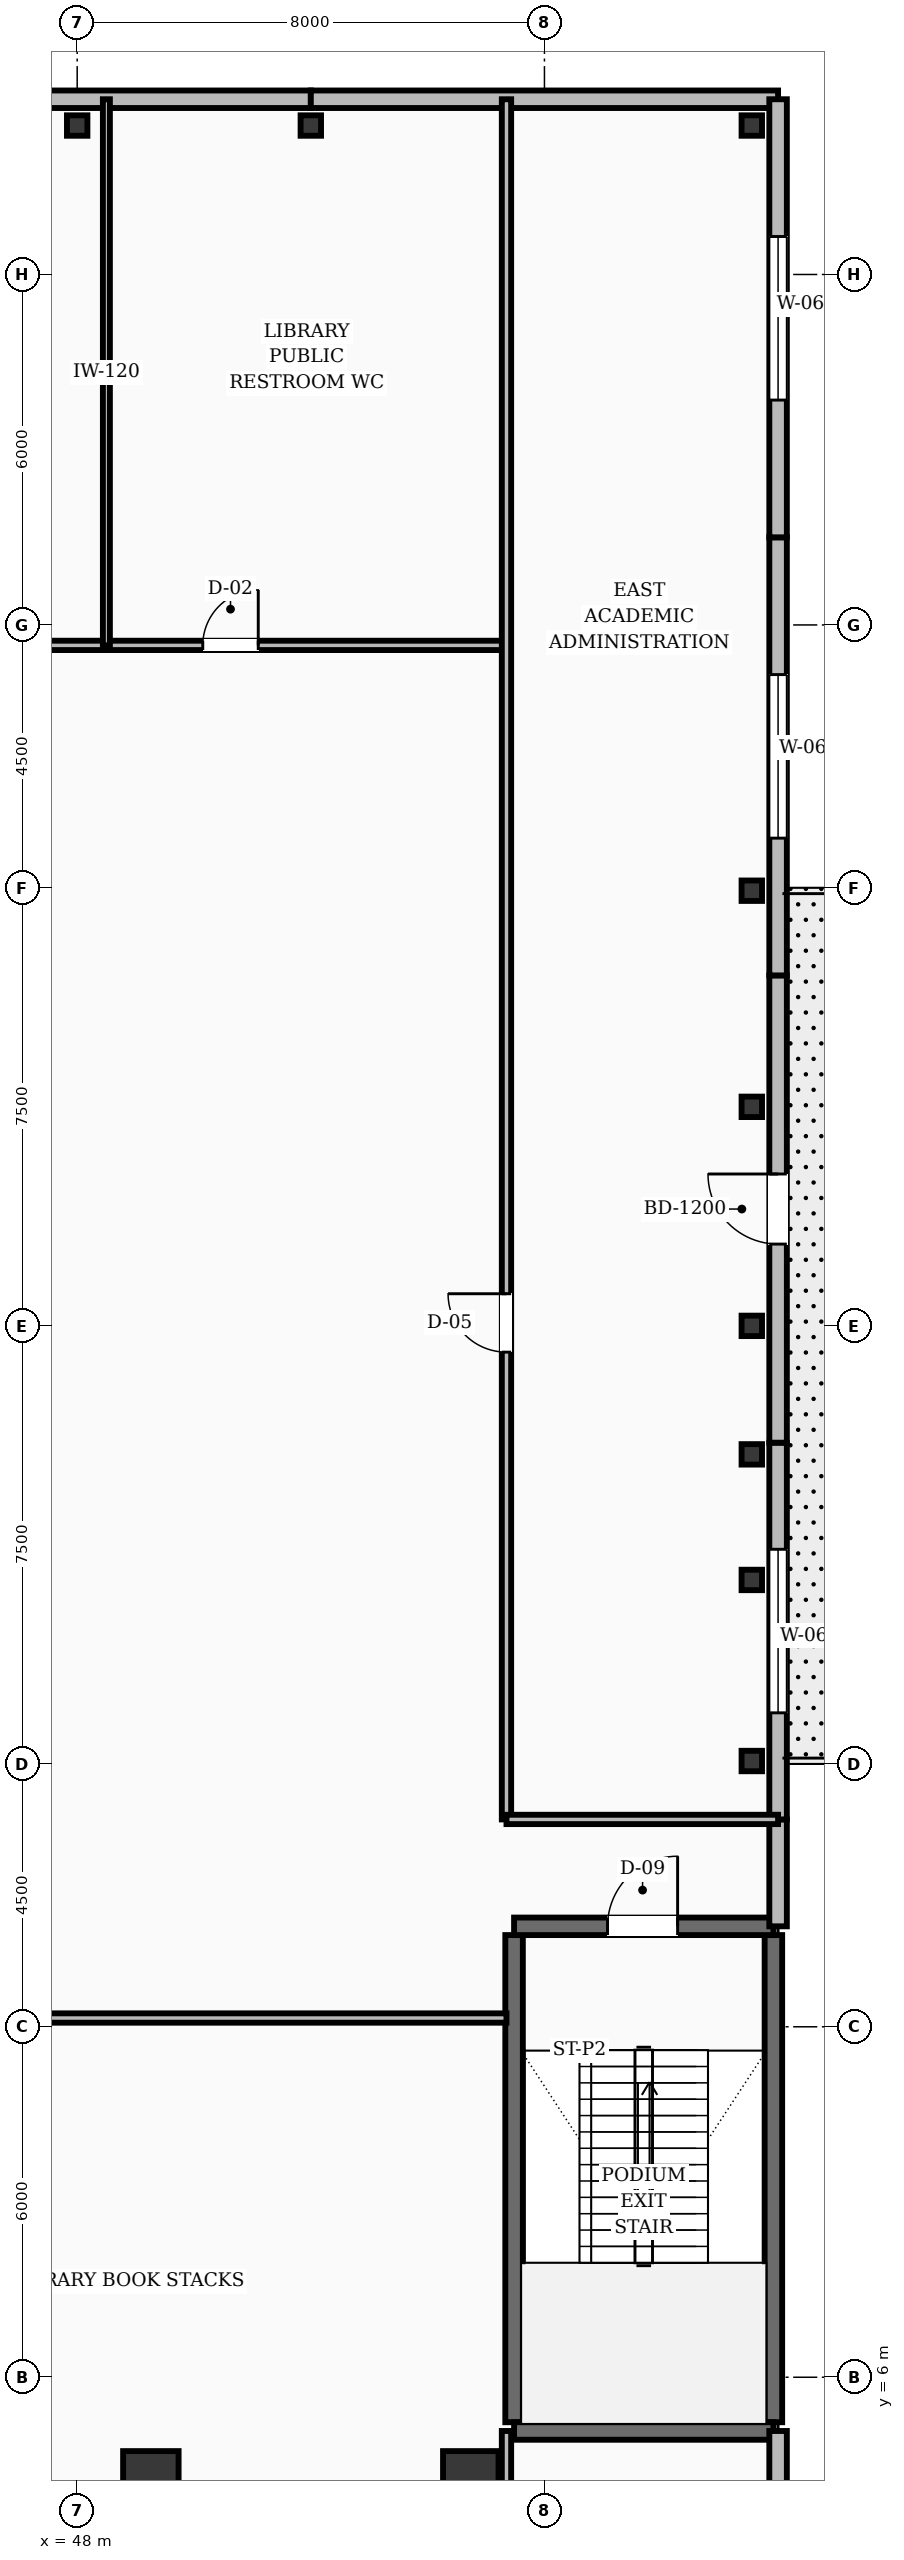
"""IFC4 building model, lengths in metres.
Left out: names, types, materials, properties, quantities, classifications, styles, units other than length and angle.
Written with IfcOpenShell. Run it as: python <this file> out.ifc"""

import sys

from ifc_helpers import new_model, si_unit, direction, frame, frame_2d, origin, origin_2d, place, context, subcontext, project, spatial, rectangle, hollow_rectangle, hollow_circle, i_section, extrude, element, fill, save


model = new_model("IFC4")
c1 = context("Model", 3, precision=1e-05, world=origin(), true_north=direction((0.0, 1.0)))
c2 = subcontext(c1, "Body", "Model", "MODEL_VIEW")
j1 = project(units=[si_unit("LENGTHUNIT", "METRE"), si_unit("PLANEANGLEUNIT", "RADIAN")], contexts=[c1])
p1 = place(None, origin())
s1 = spatial("IfcSite", under=j1, at=p1, CompositionType="ELEMENT")
p2 = place(p1, origin())
s2 = spatial("IfcBuilding", under=s1, at=p2, CompositionType="ELEMENT")
p3 = place(p2, frame((0.0, 0.0, 14.8)))
s3 = spatial("IfcBuildingStorey", under=s2, at=p3, CompositionType="ELEMENT", Elevation=14.8)
for number, where, z_axis, x_axis in (
    (1, (55.48, 5.23, 0.0), (0.0, 0.0, 1.0), (0.0, 1.0, 0.0)),
    (2, (59.92, 5.23, 0.0), (0.0, 0.0, 1.0), (0.0, 1.0, 0.0)),
):
    element("IfcWall", number, at=place(p3, frame(where, z_axis=z_axis, x_axis=x_axis)), inside=s3, PredefinedType="SHEAR", context=c2, shape_type="SweptSolid", body=[
        extrude(rectangle(XDim=8.34, YDim=0.3, at=frame_2d((4.17, 0.0))), origin(), (0.0, 0.0, 1.0), 4.8),
    ])
p4 = place(p3, frame((55.48, 5.08, 0.0), z_axis=(0.0, 0.0, 1.0), x_axis=(1.0, 0.0, 0.0)))
e3 = element("IfcWall", 3, at=p4, inside=s3, PredefinedType="SHEAR", context=c2, shape_type="SweptSolid", body=[
    extrude(rectangle(XDim=4.44, YDim=0.3, at=frame_2d((2.22, 0.0))), origin(), (0.0, 0.0, 1.0), 4.8),
])
p5 = place(p3, frame((55.48, 13.72, 0.0), z_axis=(0.0, 0.0, 1.0), x_axis=(1.0, 0.0, 0.0)))
e4 = element("IfcWall", 4, at=p5, inside=s3, PredefinedType="SHEAR", context=c2, shape_type="SweptSolid", body=[
    extrude(rectangle(XDim=4.44, YDim=0.3, at=frame_2d((2.22, 0.0))), origin(), (0.0, 0.0, 1.0), 4.8),
])
p6 = place(p5, frame((1.6, 0.0, 0.0)))
e5 = element("IfcOpeningElement", 5, at=p6, cuts=e4, PredefinedType="OPENING", context=c2, shape_type="SweptSolid", body=[
    extrude(rectangle(XDim=1.2, YDim=2.1, at=frame_2d((0.6, 1.05))), frame((0.0, 0.16, 0.0), z_axis=(0.0, -1.0, 0.0), x_axis=(1.0, 0.0, 0.0)), (0.0, 0.0, 1.0), 0.32),
])
for number, where, z_axis, x_axis in (
    (6, (52.0, 44.55, 0.0), (0.0, 0.0, 1.0), (1.0, 0.0, 0.0)),
    (7, (59.55, 44.55, 0.0), (0.0, 0.0, 1.0), (1.0, 0.0, 0.0)),
    (8, (59.55, 16.55, 0.0), (0.0, 0.0, 1.0), (1.0, 0.0, 0.0)),
    (9, (59.55, 19.65, 0.0), (0.0, 0.0, 1.0), (1.0, 0.0, 0.0)),
    (10, (59.55, 24.0, 0.0), (0.0, 0.0, 1.0), (1.0, 0.0, 0.0)),
    (11, (59.55, 27.75, 0.0), (0.0, 0.0, 1.0), (1.0, 0.0, 0.0)),
    (12, (59.55, 31.45, 0.0), (0.0, 0.0, 1.0), (1.0, 0.0, 0.0)),
):
    element("IfcColumn", number, at=place(p3, frame(where, z_axis=z_axis, x_axis=x_axis)), inside=s3, PredefinedType="COLUMN", context=c2, shape_type="SweptSolid", body=[
        extrude(i_section(OverallWidth=0.35, OverallDepth=0.35, WebThickness=0.012, FlangeThickness=0.019, FilletRadius=0.016, at=origin_2d()), origin(), (0.0, 0.0, 1.0), 4.8),
    ])
for number, where, z_axis, x_axis in (
    (13, (49.515, 4.147, 0.0), (-0.105, 0.047, 0.993), (-0.407, -0.913, 0.0)),
    (14, (54.485, 4.147, 0.0), (0.105, 0.047, 0.993), (-0.407, 0.913, 0.0)),
):
    element("IfcColumn", number, at=place(p3, frame(where, z_axis=z_axis, x_axis=x_axis)), inside=s3, PredefinedType="COLUMN", context=c2, shape_type="SweptSolid", body=[
        extrude(hollow_circle(Radius=0.475, WallThickness=0.045, at=origin_2d()), origin(), (0.0, 0.0, 1.0), 4.832),
    ])
for number, where, z_axis, x_axis in (
    (15, (48.0, 44.55, 0.0), (0.0, 0.0, 1.0), (1.0, 0.0, 0.0)),
    (16, (59.55, 21.8, 0.0), (0.0, 0.0, 1.0), (1.0, 0.0, 0.0)),
):
    element("IfcColumn", number, at=place(p3, frame(where, z_axis=z_axis, x_axis=x_axis)), inside=s3, PredefinedType="PILASTER", context=c2, shape_type="SweptSolid", body=[
        extrude(hollow_rectangle(XDim=0.35, YDim=0.35, WallThickness=0.016, at=origin_2d()), origin(), (0.0, 0.0, 1.0), 4.8),
    ])
p7 = place(p3, frame((52.0, 45.0, 0.0), z_axis=(0.0, 0.0, 1.0), x_axis=(-1.0, 0.0, 0.0)))
e17 = element("IfcWall", 17, at=p7, inside=s3, PredefinedType="STANDARD", context=c2, shape_type="SweptSolid", body=[
    extrude(rectangle(XDim=8.095, YDim=0.3, at=frame_2d((4.047, 0.0))), origin(), (0.0, 0.0, 1.0), 3.57),
])
p8 = place(p3, frame((60.0, 45.0, 0.0), z_axis=(0.0, 0.0, 1.0), x_axis=(-1.0, 0.0, 0.0)))
e18 = element("IfcWall", 18, at=p8, inside=s3, PredefinedType="STANDARD", context=c2, shape_type="SweptSolid", body=[
    extrude(rectangle(XDim=8.0, YDim=0.3, at=frame_2d((4.0, 0.0))), origin(), (0.0, 0.0, 1.0), 3.57),
])
p9 = place(p3, frame((60.0, 3.0, 0.0), z_axis=(0.0, 0.0, 1.0), x_axis=(0.0, 1.0, 0.0)))
e19 = element("IfcWall", 19, at=p9, inside=s3, PredefinedType="STANDARD", context=c2, shape_type="SweptSolid", body=[
    extrude(rectangle(XDim=2.08, YDim=0.3, at=frame_2d((1.04, 0.0))), origin(), (0.0, 0.0, 1.0), 3.57),
])
p10 = place(p3, frame((60.0, 13.72, 0.0), z_axis=(0.0, 0.0, 1.0), x_axis=(0.0, 1.0, 0.0)))
e20 = element("IfcWall", 20, at=p10, inside=s3, PredefinedType="STANDARD", context=c2, shape_type="SweptSolid", body=[
    extrude(rectangle(XDim=1.83, YDim=0.3, at=frame_2d((0.915, 0.0))), origin(), (0.0, 0.0, 1.0), 3.57),
])
p11 = place(p3, frame((60.0, 15.55, 0.0), z_axis=(0.0, 0.0, 1.0), x_axis=(0.0, 1.0, 0.0)))
e21 = element("IfcWall", 21, at=p11, inside=s3, PredefinedType="STANDARD", context=c2, shape_type="SweptSolid", body=[
    extrude(rectangle(XDim=6.45, YDim=0.3, at=frame_2d((3.225, 0.0))), origin(), (0.0, 0.0, 1.0), 3.57),
])
p12 = place(p11, frame((1.825, 0.0, 0.85)))
e22 = element("IfcOpeningElement", 22, at=p12, cuts=e21, PredefinedType="OPENING", context=c2, shape_type="SweptSolid", body=[
    extrude(rectangle(XDim=2.8, YDim=2.3, at=frame_2d((1.4, 1.15))), frame((0.0, 0.16, 0.0), z_axis=(0.0, -1.0, 0.0), x_axis=(1.0, 0.0, 0.0)), (0.0, 0.0, 1.0), 0.32),
])
p13 = place(p3, frame((60.0, 22.0, 0.0), z_axis=(0.0, 0.0, 1.0), x_axis=(0.0, 1.0, 0.0)))
e23 = element("IfcWall", 23, at=p13, inside=s3, PredefinedType="STANDARD", context=c2, shape_type="SweptSolid", body=[
    extrude(rectangle(XDim=8.0, YDim=0.3, at=frame_2d((4.0, 0.0))), origin(), (0.0, 0.0, 1.0), 3.57),
])
p14 = place(p13, frame((3.4, 0.0, 0.0)))
e24 = element("IfcOpeningElement", 24, at=p14, cuts=e23, PredefinedType="OPENING", context=c2, shape_type="SweptSolid", body=[
    extrude(rectangle(XDim=1.2, YDim=2.15, at=frame_2d((0.6, 1.075))), frame((0.0, 0.16, 0.0), z_axis=(0.0, -1.0, 0.0), x_axis=(1.0, 0.0, 0.0)), (0.0, 0.0, 1.0), 0.32),
])
p15 = place(p3, frame((60.0, 30.0, 0.0), z_axis=(0.0, 0.0, 1.0), x_axis=(0.0, 1.0, 0.0)))
e25 = element("IfcWall", 25, at=p15, inside=s3, PredefinedType="STANDARD", context=c2, shape_type="SweptSolid", body=[
    extrude(rectangle(XDim=7.5, YDim=0.3, at=frame_2d((3.75, 0.0))), origin(), (0.0, 0.0, 1.0), 3.57),
])
p16 = place(p15, frame((2.35, 0.0, 0.85)))
e26 = element("IfcOpeningElement", 26, at=p16, cuts=e25, PredefinedType="OPENING", context=c2, shape_type="SweptSolid", body=[
    extrude(rectangle(XDim=2.8, YDim=2.3, at=frame_2d((1.4, 1.15))), frame((0.0, 0.16, 0.0), z_axis=(0.0, -1.0, 0.0), x_axis=(1.0, 0.0, 0.0)), (0.0, 0.0, 1.0), 0.32),
])
p17 = place(p3, frame((60.0, 37.5, 0.0), z_axis=(0.0, 0.0, 1.0), x_axis=(0.0, 1.0, 0.0)))
e27 = element("IfcWall", 27, at=p17, inside=s3, PredefinedType="STANDARD", context=c2, shape_type="SweptSolid", body=[
    extrude(rectangle(XDim=7.5, YDim=0.3, at=frame_2d((3.75, 0.0))), origin(), (0.0, 0.0, 1.0), 3.57),
])
p18 = place(p17, frame((2.35, 0.0, 0.85)))
e28 = element("IfcOpeningElement", 28, at=p18, cuts=e27, PredefinedType="OPENING", context=c2, shape_type="SweptSolid", body=[
    extrude(rectangle(XDim=2.8, YDim=2.3, at=frame_2d((1.4, 1.15))), frame((0.0, 0.16, 0.0), z_axis=(0.0, -1.0, 0.0), x_axis=(1.0, 0.0, 0.0)), (0.0, 0.0, 1.0), 0.32),
])
p19 = place(p3, frame((8.65, 35.65, 0.0), z_axis=(0.0, 0.0, 1.0), x_axis=(1.0, 0.0, 0.0)))
e29 = element("IfcWall", 29, at=p19, inside=s3, PredefinedType="SOLIDWALL", context=c2, shape_type="SweptSolid", body=[
    extrude(rectangle(XDim=46.7, YDim=0.16, at=frame_2d((23.35, 0.0))), origin(), (0.0, 0.0, 1.0), 3.52),
])
p20 = place(p19, frame((6.0, 0.0, 0.0)))
e30 = element("IfcOpeningElement", 30, at=p20, cuts=e29, PredefinedType="OPENING", context=c2, shape_type="SweptSolid", body=[
    extrude(rectangle(XDim=1.2, YDim=2.1, at=frame_2d((0.6, 1.05))), frame((0.0, 0.09, 0.0), z_axis=(0.0, -1.0, 0.0), x_axis=(1.0, 0.0, 0.0)), (0.0, 0.0, 1.0), 0.18),
])
p21 = place(p19, frame((20.0, 0.0, 0.0)))
e31 = element("IfcOpeningElement", 31, at=p21, cuts=e29, PredefinedType="OPENING", context=c2, shape_type="SweptSolid", body=[
    extrude(rectangle(XDim=1.0, YDim=2.1, at=frame_2d((0.5, 1.05))), frame((0.0, 0.09, 0.0), z_axis=(0.0, -1.0, 0.0), x_axis=(1.0, 0.0, 0.0)), (0.0, 0.0, 1.0), 0.18),
])
p22 = place(p19, frame((41.5, 0.0, 0.0)))
e32 = element("IfcOpeningElement", 32, at=p22, cuts=e29, PredefinedType="OPENING", context=c2, shape_type="SweptSolid", body=[
    extrude(rectangle(XDim=0.95, YDim=2.1, at=frame_2d((0.475, 1.05))), frame((0.0, 0.09, 0.0), z_axis=(0.0, -1.0, 0.0), x_axis=(1.0, 0.0, 0.0)), (0.0, 0.0, 1.0), 0.18),
])
p23 = place(p3, frame((4.0, 12.15, 0.0), z_axis=(0.0, 0.0, 1.0), x_axis=(1.0, 0.0, 0.0)))
e33 = element("IfcWall", 33, at=p23, inside=s3, PredefinedType="SOLIDWALL", context=c2, shape_type="SweptSolid", body=[
    extrude(rectangle(XDim=51.35, YDim=0.16, at=frame_2d((25.675, 0.0))), origin(), (0.0, 0.0, 1.0), 3.52),
])
p24 = place(p23, frame((12.0, 0.0, 0.0)))
e34 = element("IfcOpeningElement", 34, at=p24, cuts=e33, PredefinedType="OPENING", context=c2, shape_type="SweptSolid", body=[
    extrude(rectangle(XDim=1.4, YDim=2.15, at=frame_2d((0.7, 1.075))), frame((0.0, 0.09, 0.0), z_axis=(0.0, -1.0, 0.0), x_axis=(1.0, 0.0, 0.0)), (0.0, 0.0, 1.0), 0.18),
])
p25 = place(p23, frame((38.0, 0.0, 0.0)))
e35 = element("IfcOpeningElement", 35, at=p25, cuts=e33, PredefinedType="OPENING", context=c2, shape_type="SweptSolid", body=[
    extrude(rectangle(XDim=1.2, YDim=2.1, at=frame_2d((0.6, 1.05))), frame((0.0, 0.09, 0.0), z_axis=(0.0, -1.0, 0.0), x_axis=(1.0, 0.0, 0.0)), (0.0, 0.0, 1.0), 0.18),
])
p26 = place(p3, frame((55.35, 15.55, 0.0), z_axis=(0.0, 0.0, 1.0), x_axis=(0.0, 1.0, 0.0)))
e36 = element("IfcWall", 36, at=p26, inside=s3, PredefinedType="SOLIDWALL", context=c2, shape_type="SweptSolid", body=[
    extrude(rectangle(XDim=29.45, YDim=0.16, at=frame_2d((14.725, 0.0))), origin(), (0.0, 0.0, 1.0), 3.52),
])
p27 = place(p26, frame((8.0, 0.0, 0.0)))
e37 = element("IfcOpeningElement", 37, at=p27, cuts=e36, PredefinedType="OPENING", context=c2, shape_type="SweptSolid", body=[
    extrude(rectangle(XDim=1.0, YDim=2.1, at=frame_2d((0.5, 1.05))), frame((0.0, 0.09, 0.0), z_axis=(0.0, -1.0, 0.0), x_axis=(1.0, 0.0, 0.0)), (0.0, 0.0, 1.0), 0.18),
])
p28 = place(p3, frame((55.35, 15.55, 0.0), z_axis=(0.0, 0.0, 1.0), x_axis=(1.0, 0.0, 0.0)))
e38 = element("IfcWall", 38, at=p28, inside=s3, PredefinedType="SOLIDWALL", context=c2, shape_type="SweptSolid", body=[
    extrude(rectangle(XDim=4.65, YDim=0.16, at=frame_2d((2.325, 0.0))), origin(), (0.0, 0.0, 1.0), 3.52),
])
p29 = place(p3, frame((55.35, 3.0, 0.0), z_axis=(0.0, 0.0, 1.0), x_axis=(0.0, 1.0, 0.0)))
e39 = element("IfcWall", 39, at=p29, inside=s3, PredefinedType="SOLIDWALL", context=c2, shape_type="SweptSolid", body=[
    extrude(rectangle(XDim=2.08, YDim=0.16, at=frame_2d((1.04, 0.0))), origin(), (0.0, 0.0, 1.0), 3.52),
])
p30 = place(p3, frame((48.5, 35.65, 0.0), z_axis=(0.0, 0.0, 1.0), x_axis=(0.0, 1.0, 0.0)))
e40 = element("IfcWall", 40, at=p30, inside=s3, PredefinedType="PARTITIONING", context=c2, shape_type="SweptSolid", body=[
    extrude(rectangle(XDim=9.35, YDim=0.12, at=frame_2d((4.675, 0.0))), origin(), (0.0, 0.0, 1.0), 3.52),
])
p31 = place(p12, origin())
e41 = element("IfcWindow", 41, at=p31, inside=s3, PartitioningType="SINGLE_PANEL", PredefinedType="WINDOW", context=c2, shape_type="SweptSolid", body=[
    extrude(rectangle(XDim=2.8, YDim=2.3, at=frame_2d((1.4, 1.15))), frame((0.0, 0.03, 0.0), z_axis=(0.0, -1.0, 0.0), x_axis=(1.0, 0.0, 0.0)), (0.0, 0.0, 1.0), 0.06),
])
fill(e22, e41)
p32 = place(p14, origin())
e42 = element("IfcDoor", 42, at=p32, inside=s3, OperationType="SINGLE_SWING_RIGHT", PredefinedType="DOOR", context=c2, shape_type="SweptSolid", body=[
    extrude(rectangle(XDim=1.2, YDim=2.15, at=frame_2d((0.6, 1.075))), frame((0.0, 0.025, 0.0), z_axis=(0.0, -1.0, 0.0), x_axis=(1.0, 0.0, 0.0)), (0.0, 0.0, 1.0), 0.05),
])
fill(e24, e42)
p33 = place(p16, origin())
e43 = element("IfcWindow", 43, at=p33, inside=s3, PartitioningType="SINGLE_PANEL", PredefinedType="WINDOW", context=c2, shape_type="SweptSolid", body=[
    extrude(rectangle(XDim=2.8, YDim=2.3, at=frame_2d((1.4, 1.15))), frame((0.0, 0.03, 0.0), z_axis=(0.0, -1.0, 0.0), x_axis=(1.0, 0.0, 0.0)), (0.0, 0.0, 1.0), 0.06),
])
fill(e26, e43)
p34 = place(p18, origin())
e44 = element("IfcWindow", 44, at=p34, inside=s3, PartitioningType="SINGLE_PANEL", PredefinedType="WINDOW", context=c2, shape_type="SweptSolid", body=[
    extrude(rectangle(XDim=2.8, YDim=2.3, at=frame_2d((1.4, 1.15))), frame((0.0, 0.03, 0.0), z_axis=(0.0, -1.0, 0.0), x_axis=(1.0, 0.0, 0.0)), (0.0, 0.0, 1.0), 0.06),
])
fill(e28, e44)
p35 = place(p6, origin())
e45 = element("IfcDoor", 45, at=p35, inside=s3, OperationType="SINGLE_SWING_RIGHT", PredefinedType="DOOR", context=c2, shape_type="SweptSolid", body=[
    extrude(rectangle(XDim=1.2, YDim=2.1, at=frame_2d((0.6, 1.05))), frame((0.0, 0.025, 0.0), z_axis=(0.0, -1.0, 0.0), x_axis=(1.0, 0.0, 0.0)), (0.0, 0.0, 1.0), 0.05),
])
fill(e5, e45)
p36 = place(p22, origin())
e46 = element("IfcDoor", 46, at=p36, inside=s3, OperationType="SINGLE_SWING_RIGHT", PredefinedType="DOOR", context=c2, shape_type="SweptSolid", body=[
    extrude(rectangle(XDim=0.95, YDim=2.1, at=frame_2d((0.475, 1.05))), frame((0.0, 0.025, 0.0), z_axis=(0.0, -1.0, 0.0), x_axis=(1.0, 0.0, 0.0)), (0.0, 0.0, 1.0), 0.05),
])
fill(e32, e46)
p37 = place(p27, origin())
e47 = element("IfcDoor", 47, at=p37, inside=s3, OperationType="SINGLE_SWING_RIGHT", PredefinedType="DOOR", context=c2, shape_type="SweptSolid", body=[
    extrude(rectangle(XDim=1.0, YDim=2.1, at=frame_2d((0.5, 1.05))), frame((0.0, 0.025, 0.0), z_axis=(0.0, -1.0, 0.0), x_axis=(1.0, 0.0, 0.0)), (0.0, 0.0, 1.0), 0.05),
])
fill(e37, e47)
save(model, sys.argv[1])
